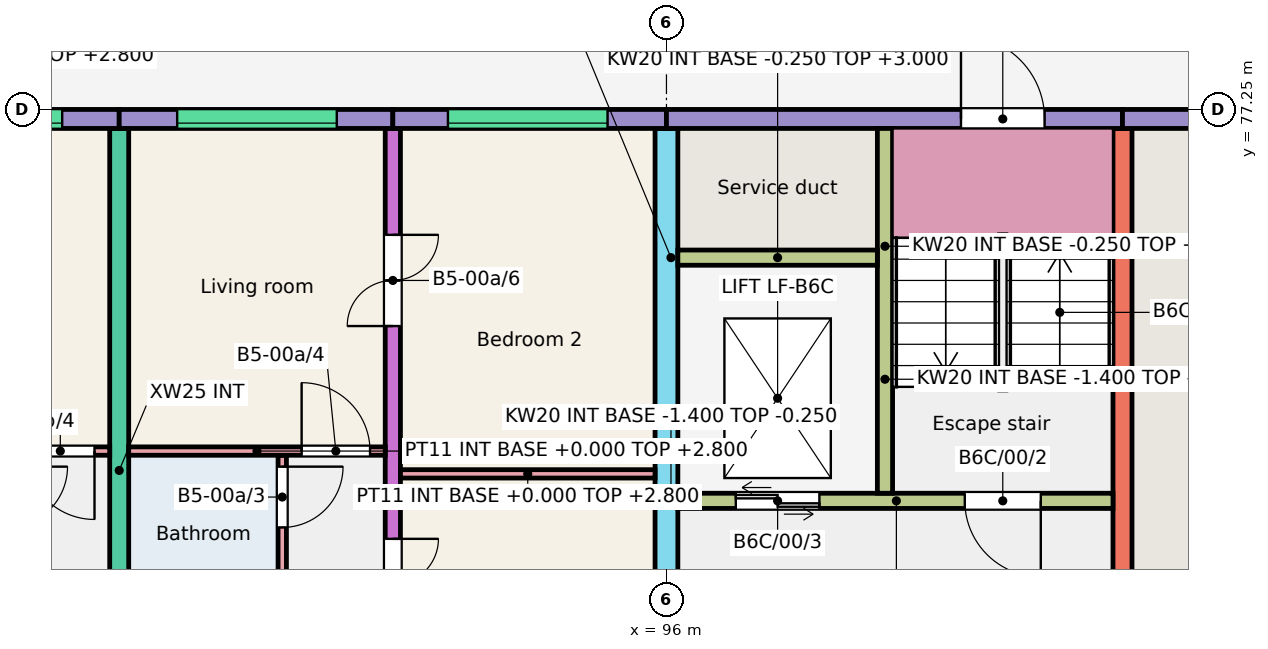
"""IFC4 building model, lengths in metres.
Left out: names, types, materials, properties, quantities, classifications, styles, units other than length and angle.
Written with IfcOpenShell. Run it as: python <this file> out.ifc"""

import sys

from ifc_helpers import new_model, si_unit, direction, frame, frame_2d, origin, place, context, subcontext, project, spatial, rectangle, extrude, element, fill, save


model = new_model("IFC4")
c1 = context("Model", 3, precision=1e-05, world=origin(), true_north=direction((0.0, 1.0)))
c2 = subcontext(c1, "Body", "Model", "MODEL_VIEW")
j1 = project(units=[si_unit("LENGTHUNIT", "METRE"), si_unit("PLANEANGLEUNIT", "RADIAN")], contexts=[c1])
p1 = place(None, origin())
s1 = spatial("IfcSite", under=j1, at=p1, CompositionType="ELEMENT")
p2 = place(p1, origin())
s2 = spatial("IfcBuilding", under=s1, at=p2, CompositionType="ELEMENT")
p3 = place(p2, origin())
s3 = spatial("IfcBuildingStorey", under=s2, at=p3, CompositionType="ELEMENT", Elevation=0.0)
p4 = place(p3, frame((88.8, 68.0, -0.25), z_axis=(0.0, 0.0, 1.0), x_axis=(0.0, 1.0, 0.0)))
e1 = element("IfcWall", 1, at=p4, inside=s3, PredefinedType="SHEAR", context=c2, shape_type="SweptSolid", body=[
    extrude(rectangle(XDim=9.0, YDim=0.25, at=frame_2d((4.5, 0.0))), origin(), (0.0, 0.0, 1.0), 3.25),
])
p5 = place(p3, frame((92.4, 68.0, -0.25), z_axis=(0.0, 0.0, 1.0), x_axis=(0.0, 1.0, 0.0)))
e2 = element("IfcWall", 2, at=p5, inside=s3, PredefinedType="SHEAR", context=c2, shape_type="SweptSolid", body=[
    extrude(rectangle(XDim=9.0, YDim=0.2, at=frame_2d((4.5, 0.0))), origin(), (0.0, 0.0, 1.0), 3.25),
])
p6 = place(p5, frame((2.4, 0.0, 0.25)))
e3 = element("IfcOpeningElement", 3, at=p6, cuts=e2, PredefinedType="OPENING", context=c2, shape_type="SweptSolid", body=[
    extrude(rectangle(XDim=1.2, YDim=2.1, at=frame_2d((0.6, 1.05))), frame((0.0, 0.11, 0.0), z_axis=(0.0, -1.0, 0.0), x_axis=(1.0, 0.0, 0.0)), (0.0, 0.0, 1.0), 0.22),
])
p7 = place(p5, frame((6.4, 0.0, 0.25)))
e4 = element("IfcOpeningElement", 4, at=p7, cuts=e2, PredefinedType="OPENING", context=c2, shape_type="SweptSolid", body=[
    extrude(rectangle(XDim=1.2, YDim=2.1, at=frame_2d((0.6, 1.05))), frame((0.0, 0.11, 0.0), z_axis=(0.0, -1.0, 0.0), x_axis=(1.0, 0.0, 0.0)), (0.0, 0.0, 1.0), 0.22),
])
p8 = place(p3, frame((96.0, 66.0, -0.25), z_axis=(0.0, 0.0, 1.0), x_axis=(0.0, 1.0, 0.0)))
e5 = element("IfcWall", 5, at=p8, inside=s3, PredefinedType="SHEAR", context=c2, shape_type="SweptSolid", body=[
    extrude(rectangle(XDim=11.0, YDim=0.3, at=frame_2d((5.5, 0.0))), origin(), (0.0, 0.0, 1.0), 3.25),
])
p9 = place(p8, frame((0.3, 0.0, 0.25)))
e6 = element("IfcOpeningElement", 6, at=p9, cuts=e5, PredefinedType="OPENING", context=c2, shape_type="SweptSolid", body=[
    extrude(rectangle(XDim=1.2, YDim=2.1, at=frame_2d((0.6, 1.05))), frame((0.0, 0.16, 0.0), z_axis=(0.0, -1.0, 0.0), x_axis=(1.0, 0.0, 0.0)), (0.0, 0.0, 1.0), 0.32),
])
p10 = place(p3, frame((102.0, 68.0, -0.25), z_axis=(0.0, 0.0, 1.0), x_axis=(0.0, 1.0, 0.0)))
e7 = element("IfcWall", 7, at=p10, inside=s3, PredefinedType="SHEAR", context=c2, shape_type="SweptSolid", body=[
    extrude(rectangle(XDim=9.0, YDim=0.25, at=frame_2d((4.5, 0.0))), origin(), (0.0, 0.0, 1.0), 3.25),
])
p11 = place(p3, frame((85.2, 77.125, -0.25), z_axis=(0.0, 0.0, 1.0), x_axis=(1.0, 0.0, 0.0)))
e8 = element("IfcWall", 8, at=p11, inside=s3, PredefinedType="SOLIDWALL", context=c2, shape_type="SweptSolid", body=[
    extrude(rectangle(XDim=3.6, YDim=0.25, at=frame_2d((1.8, 0.0))), origin(), (0.0, 0.0, 1.0), 3.25),
])
p12 = place(p11, frame((0.75, 0.0, 1.45)))
e9 = element("IfcOpeningElement", 9, at=p12, cuts=e8, PredefinedType="OPENING", context=c2, shape_type="SweptSolid", body=[
    extrude(rectangle(XDim=2.1, YDim=1.2, at=frame_2d((1.05, 0.6))), frame((0.0, 0.135, 0.0), z_axis=(0.0, -1.0, 0.0), x_axis=(1.0, 0.0, 0.0)), (0.0, 0.0, 1.0), 0.27),
])
p13 = place(p3, frame((88.8, 77.125, -0.25), z_axis=(0.0, 0.0, 1.0), x_axis=(1.0, 0.0, 0.0)))
e10 = element("IfcWall", 10, at=p13, inside=s3, PredefinedType="SOLIDWALL", context=c2, shape_type="SweptSolid", body=[
    extrude(rectangle(XDim=3.6, YDim=0.25, at=frame_2d((1.8, 0.0))), origin(), (0.0, 0.0, 1.0), 3.25),
])
p14 = place(p13, frame((0.762, 0.0, 1.45)))
e11 = element("IfcOpeningElement", 11, at=p14, cuts=e10, PredefinedType="OPENING", context=c2, shape_type="SweptSolid", body=[
    extrude(rectangle(XDim=2.1, YDim=1.2, at=frame_2d((1.05, 0.6))), frame((0.0, 0.135, 0.0), z_axis=(0.0, -1.0, 0.0), x_axis=(1.0, 0.0, 0.0)), (0.0, 0.0, 1.0), 0.27),
])
p15 = place(p3, frame((92.4, 77.125, -0.25), z_axis=(0.0, 0.0, 1.0), x_axis=(1.0, 0.0, 0.0)))
e12 = element("IfcWall", 12, at=p15, inside=s3, PredefinedType="SOLIDWALL", context=c2, shape_type="SweptSolid", body=[
    extrude(rectangle(XDim=3.6, YDim=0.25, at=frame_2d((1.8, 0.0))), origin(), (0.0, 0.0, 1.0), 3.25),
])
p16 = place(p15, frame((0.725, 0.0, 1.45)))
e13 = element("IfcOpeningElement", 13, at=p16, cuts=e12, PredefinedType="OPENING", context=c2, shape_type="SweptSolid", body=[
    extrude(rectangle(XDim=2.1, YDim=1.2, at=frame_2d((1.05, 0.6))), frame((0.0, 0.135, 0.0), z_axis=(0.0, -1.0, 0.0), x_axis=(1.0, 0.0, 0.0)), (0.0, 0.0, 1.0), 0.27),
])
p17 = place(p3, frame((96.0, 77.125, -0.25), z_axis=(0.0, 0.0, 1.0), x_axis=(1.0, 0.0, 0.0)))
e14 = element("IfcWall", 14, at=p17, inside=s3, PredefinedType="SOLIDWALL", context=c2, shape_type="SweptSolid", body=[
    extrude(rectangle(XDim=6.0, YDim=0.25, at=frame_2d((3.0, 0.0))), origin(), (0.0, 0.0, 1.0), 3.25),
])
p18 = place(p17, frame((3.875, 0.0, 0.25)))
e15 = element("IfcOpeningElement", 15, at=p18, cuts=e14, PredefinedType="OPENING", context=c2, shape_type="SweptSolid", body=[
    extrude(rectangle(XDim=1.1, YDim=2.1, at=frame_2d((0.55, 1.05))), frame((0.0, 0.135, 0.0), z_axis=(0.0, -1.0, 0.0), x_axis=(1.0, 0.0, 0.0)), (0.0, 0.0, 1.0), 0.27),
])
p19 = place(p3, frame((96.15, 72.1, -0.25), z_axis=(0.0, 0.0, 1.0), x_axis=(1.0, 0.0, 0.0)))
e16 = element("IfcWall", 16, at=p19, inside=s3, PredefinedType="SHEAR", context=c2, shape_type="SweptSolid", body=[
    extrude(rectangle(XDim=5.725, YDim=0.2, at=frame_2d((2.863, 0.0))), origin(), (0.0, 0.0, 1.0), 3.25),
])
p20 = place(p19, frame((3.775, 0.0, 0.25)))
e17 = element("IfcOpeningElement", 17, at=p20, cuts=e16, PredefinedType="OPENING", context=c2, shape_type="SweptSolid", body=[
    extrude(rectangle(XDim=1.0, YDim=2.1, at=frame_2d((0.5, 1.05))), frame((0.0, 0.11, 0.0), z_axis=(0.0, -1.0, 0.0), x_axis=(1.0, 0.0, 0.0)), (0.0, 0.0, 1.0), 0.22),
])
p21 = place(p19, frame((0.762, 0.0, 0.25)))
e18 = element("IfcOpeningElement", 18, at=p21, cuts=e16, PredefinedType="OPENING", context=c2, shape_type="SweptSolid", body=[
    extrude(rectangle(XDim=1.1, YDim=2.1, at=frame_2d((0.55, 1.05))), frame((0.0, 0.11, 0.0), z_axis=(0.0, -1.0, 0.0), x_axis=(1.0, 0.0, 0.0)), (0.0, 0.0, 1.0), 0.22),
])
p22 = place(p3, frame((98.875, 72.2, -0.25), z_axis=(0.0, 0.0, 1.0), x_axis=(0.0, 1.0, 0.0)))
e19 = element("IfcWall", 19, at=p22, inside=s3, PredefinedType="SHEAR", context=c2, shape_type="SweptSolid", body=[
    extrude(rectangle(XDim=4.8, YDim=0.2, at=frame_2d((2.4, 0.0))), origin(), (0.0, 0.0, 1.0), 3.25),
])
p23 = place(p3, frame((96.15, 75.3, -0.25), z_axis=(0.0, 0.0, 1.0), x_axis=(1.0, 0.0, 0.0)))
e20 = element("IfcWall", 20, at=p23, inside=s3, PredefinedType="SHEAR", context=c2, shape_type="SweptSolid", body=[
    extrude(rectangle(XDim=2.625, YDim=0.2, at=frame_2d((1.312, 0.0))), origin(), (0.0, 0.0, 1.0), 3.25),
])
p24 = place(p3, frame((102.0, 77.125, -0.25), z_axis=(0.0, 0.0, 1.0), x_axis=(1.0, 0.0, 0.0)))
e21 = element("IfcWall", 21, at=p24, inside=s3, PredefinedType="SOLIDWALL", context=c2, shape_type="SweptSolid", body=[
    extrude(rectangle(XDim=3.6, YDim=0.25, at=frame_2d((1.8, 0.0))), origin(), (0.0, 0.0, 1.0), 3.25),
])
p25 = place(p24, frame((1.312, 0.0, 0.25)))
e22 = element("IfcOpeningElement", 22, at=p25, cuts=e21, PredefinedType="OPENING", context=c2, shape_type="SweptSolid", body=[
    extrude(rectangle(XDim=1.0, YDim=2.1, at=frame_2d((0.5, 1.05))), frame((0.0, 0.135, 0.0), z_axis=(0.0, -1.0, 0.0), x_axis=(1.0, 0.0, 0.0)), (0.0, 0.0, 1.0), 0.27),
])
for number, where, z_axis, x_axis in (
    (23, (96.0, 72.1, -1.4), (0.0, 0.0, 1.0), (1.0, 0.0, 0.0)),
    (24, (96.0, 75.3, -1.4), (0.0, 0.0, 1.0), (1.0, 0.0, 0.0)),
):
    element("IfcWall", number, at=place(p3, frame(where, z_axis=z_axis, x_axis=x_axis)), inside=s3, PredefinedType="SHEAR", context=c2, shape_type="SweptSolid", body=[
        extrude(rectangle(XDim=2.975, YDim=0.2, at=frame_2d((1.488, 0.0))), origin(), (0.0, 0.0, 1.0), 1.15),
    ])
p26 = place(p3, frame((98.875, 72.2, -1.4), z_axis=(0.0, 0.0, 1.0), x_axis=(0.0, 1.0, 0.0)))
e25 = element("IfcWall", 25, at=p26, inside=s3, PredefinedType="SHEAR", context=c2, shape_type="SweptSolid", body=[
    extrude(rectangle(XDim=3.0, YDim=0.2, at=frame_2d((1.5, 0.0))), origin(), (0.0, 0.0, 1.0), 1.15),
])
p27 = place(p3, frame((96.075, 72.2, -1.4), z_axis=(0.0, 0.0, 1.0), x_axis=(0.0, 1.0, 0.0)))
e26 = element("IfcWall", 26, at=p27, inside=s3, PredefinedType="SHEAR", context=c2, shape_type="SweptSolid", body=[
    extrude(rectangle(XDim=3.0, YDim=0.15, at=frame_2d((1.5, 0.0))), origin(), (0.0, 0.0, 1.0), 1.15),
])
p28 = place(p3, frame((90.945, 68.0, 0.0), z_axis=(0.0, 0.0, 1.0), x_axis=(0.0, 1.0, 0.0)))
e27 = element("IfcWall", 27, at=p28, inside=s3, PredefinedType="PARTITIONING", context=c2, shape_type="SweptSolid", body=[
    extrude(rectangle(XDim=4.7, YDim=0.11, at=frame_2d((2.35, 0.0))), origin(), (0.0, 0.0, 1.0), 2.8),
])
p29 = place(p28, frame((0.2, 0.0, 0.0)))
e28 = element("IfcOpeningElement", 28, at=p29, cuts=e27, PredefinedType="OPENING", context=c2, shape_type="SweptSolid", body=[
    extrude(rectangle(XDim=0.8, YDim=2.1, at=frame_2d((0.4, 1.05))), frame((0.0, 0.065, 0.0), z_axis=(0.0, -1.0, 0.0), x_axis=(1.0, 0.0, 0.0)), (0.0, 0.0, 1.0), 0.13),
])
p30 = place(p28, frame((3.75, 0.0, 0.0)))
e29 = element("IfcOpeningElement", 29, at=p30, cuts=e27, PredefinedType="OPENING", context=c2, shape_type="SweptSolid", body=[
    extrude(rectangle(XDim=0.8, YDim=2.1, at=frame_2d((0.4, 1.05))), frame((0.0, 0.065, 0.0), z_axis=(0.0, -1.0, 0.0), x_axis=(1.0, 0.0, 0.0)), (0.0, 0.0, 1.0), 0.13),
])
p31 = place(p3, frame((88.925, 72.755, 0.0), z_axis=(0.0, 0.0, 1.0), x_axis=(1.0, 0.0, 0.0)))
e30 = element("IfcWall", 30, at=p31, inside=s3, PredefinedType="PARTITIONING", context=c2, shape_type="SweptSolid", body=[
    extrude(rectangle(XDim=3.375, YDim=0.11, at=frame_2d((1.688, 0.0))), origin(), (0.0, 0.0, 1.0), 2.8),
])
p32 = place(p31, frame((2.275, 0.0, 0.0)))
e31 = element("IfcOpeningElement", 31, at=p32, cuts=e30, PredefinedType="OPENING", context=c2, shape_type="SweptSolid", body=[
    extrude(rectangle(XDim=0.9, YDim=2.1, at=frame_2d((0.45, 1.05))), frame((0.0, 0.065, 0.0), z_axis=(0.0, -1.0, 0.0), x_axis=(1.0, 0.0, 0.0)), (0.0, 0.0, 1.0), 0.13),
])
p33 = place(p3, frame((92.5, 72.455, 0.0), z_axis=(0.0, 0.0, 1.0), x_axis=(1.0, 0.0, 0.0)))
e32 = element("IfcWall", 32, at=p33, inside=s3, PredefinedType="PARTITIONING", context=c2, shape_type="SweptSolid", body=[
    extrude(rectangle(XDim=3.35, YDim=0.11, at=frame_2d((1.675, 0.0))), origin(), (0.0, 0.0, 1.0), 2.8),
])
p34 = place(p3, frame((85.325, 72.755, 0.0), z_axis=(0.0, 0.0, 1.0), x_axis=(1.0, 0.0, 0.0)))
e33 = element("IfcWall", 33, at=p34, inside=s3, PredefinedType="PARTITIONING", context=c2, shape_type="SweptSolid", body=[
    extrude(rectangle(XDim=3.35, YDim=0.11, at=frame_2d((1.675, 0.0))), origin(), (0.0, 0.0, 1.0), 2.8),
])
p35 = place(p34, frame((2.25, 0.0, 0.0)))
e34 = element("IfcOpeningElement", 34, at=p35, cuts=e33, PredefinedType="OPENING", context=c2, shape_type="SweptSolid", body=[
    extrude(rectangle(XDim=0.9, YDim=2.1, at=frame_2d((0.45, 1.05))), frame((0.0, 0.065, 0.0), z_axis=(0.0, -1.0, 0.0), x_axis=(1.0, 0.0, 0.0)), (0.0, 0.0, 1.0), 0.13),
])
p36 = place(p16, origin())
e35 = element("IfcWindow", 35, at=p36, inside=s3, PartitioningType="SINGLE_PANEL", PredefinedType="WINDOW", context=c2, shape_type="SweptSolid", body=[
    extrude(rectangle(XDim=2.1, YDim=1.2, at=frame_2d((1.05, 0.6))), frame((0.0, -0.025, 0.0), z_axis=(0.0, -1.0, 0.0), x_axis=(1.0, 0.0, 0.0)), (0.0, 0.0, 1.0), 0.06),
])
fill(e13, e35)
p37 = place(p14, origin())
e36 = element("IfcWindow", 36, at=p37, inside=s3, PartitioningType="SINGLE_PANEL", PredefinedType="WINDOW", context=c2, shape_type="SweptSolid", body=[
    extrude(rectangle(XDim=2.1, YDim=1.2, at=frame_2d((1.05, 0.6))), frame((0.0, -0.025, 0.0), z_axis=(0.0, -1.0, 0.0), x_axis=(1.0, 0.0, 0.0)), (0.0, 0.0, 1.0), 0.06),
])
fill(e11, e36)
p38 = place(p12, origin())
e37 = element("IfcWindow", 37, at=p38, inside=s3, PartitioningType="SINGLE_PANEL", PredefinedType="WINDOW", context=c2, shape_type="SweptSolid", body=[
    extrude(rectangle(XDim=2.1, YDim=1.2, at=frame_2d((1.05, 0.6))), frame((0.0, -0.025, 0.0), z_axis=(0.0, -1.0, 0.0), x_axis=(1.0, 0.0, 0.0)), (0.0, 0.0, 1.0), 0.06),
])
fill(e9, e37)
p39 = place(p30, origin())
e38 = element("IfcDoor", 38, at=p39, inside=s3, OperationType="SINGLE_SWING_RIGHT", PredefinedType="DOOR", context=c2, shape_type="SweptSolid", body=[
    extrude(rectangle(XDim=0.8, YDim=2.1, at=frame_2d((0.4, 1.05))), frame((0.0, 0.025, 0.0), z_axis=(0.0, -1.0, 0.0), x_axis=(1.0, 0.0, 0.0)), (0.0, 0.0, 1.0), 0.05),
])
fill(e29, e38)
p40 = place(p32, origin())
e39 = element("IfcDoor", 39, at=p40, inside=s3, OperationType="SINGLE_SWING_LEFT", PredefinedType="DOOR", context=c2, shape_type="SweptSolid", body=[
    extrude(rectangle(XDim=0.9, YDim=2.1, at=frame_2d((0.45, 1.05))), frame((0.0, 0.025, 0.0), z_axis=(0.0, -1.0, 0.0), x_axis=(1.0, 0.0, 0.0)), (0.0, 0.0, 1.0), 0.05),
])
fill(e31, e39)
p41 = place(p6, origin())
e40 = element("IfcDoor", 40, at=p41, inside=s3, OperationType="DOUBLE_DOOR_SINGLE_SWING", PredefinedType="DOOR", context=c2, shape_type="SweptSolid", body=[
    extrude(rectangle(XDim=1.2, YDim=2.1, at=frame_2d((0.6, 1.05))), frame((0.0, 0.025, 0.0), z_axis=(0.0, -1.0, 0.0), x_axis=(1.0, 0.0, 0.0)), (0.0, 0.0, 1.0), 0.05),
])
fill(e3, e40)
p42 = place(p7, origin())
e41 = element("IfcDoor", 41, at=p42, inside=s3, OperationType="DOUBLE_DOOR_SINGLE_SWING", PredefinedType="DOOR", context=c2, shape_type="SweptSolid", body=[
    extrude(rectangle(XDim=1.2, YDim=2.1, at=frame_2d((0.6, 1.05))), frame((0.0, 0.025, 0.0), z_axis=(0.0, -1.0, 0.0), x_axis=(1.0, 0.0, 0.0)), (0.0, 0.0, 1.0), 0.05),
])
fill(e4, e41)
p43 = place(p35, origin())
e42 = element("IfcDoor", 42, at=p43, inside=s3, OperationType="SINGLE_SWING_RIGHT", PredefinedType="DOOR", context=c2, shape_type="SweptSolid", body=[
    extrude(rectangle(XDim=0.9, YDim=2.1, at=frame_2d((0.45, 1.05))), frame((0.0, 0.025, 0.0), z_axis=(0.0, -1.0, 0.0), x_axis=(1.0, 0.0, 0.0)), (0.0, 0.0, 1.0), 0.05),
])
fill(e34, e42)
p44 = place(p20, origin())
e43 = element("IfcDoor", 43, at=p44, inside=s3, OperationType="SINGLE_SWING_RIGHT", PredefinedType="DOOR", context=c2, shape_type="SweptSolid", body=[
    extrude(rectangle(XDim=1.0, YDim=2.1, at=frame_2d((0.5, 1.05))), frame((0.0, 0.025, 0.0), z_axis=(0.0, -1.0, 0.0), x_axis=(1.0, 0.0, 0.0)), (0.0, 0.0, 1.0), 0.05),
])
fill(e17, e43)
p45 = place(p21, origin())
e44 = element("IfcDoor", 44, at=p45, inside=s3, OperationType="DOUBLE_DOOR_SLIDING", PredefinedType="DOOR", context=c2, shape_type="SweptSolid", body=[
    extrude(rectangle(XDim=1.1, YDim=2.1, at=frame_2d((0.55, 1.05))), frame((0.0, 0.025, 0.0), z_axis=(0.0, -1.0, 0.0), x_axis=(1.0, 0.0, 0.0)), (0.0, 0.0, 1.0), 0.05),
])
fill(e18, e44)
p46 = place(p18, origin())
e45 = element("IfcDoor", 45, at=p46, inside=s3, OperationType="SINGLE_SWING_LEFT", PredefinedType="DOOR", context=c2, shape_type="SweptSolid", body=[
    extrude(rectangle(XDim=1.1, YDim=2.1, at=frame_2d((0.55, 1.05))), frame((0.0, 0.025, 0.0), z_axis=(0.0, -1.0, 0.0), x_axis=(1.0, 0.0, 0.0)), (0.0, 0.0, 1.0), 0.05),
])
fill(e15, e45)
save(model, sys.argv[1])
